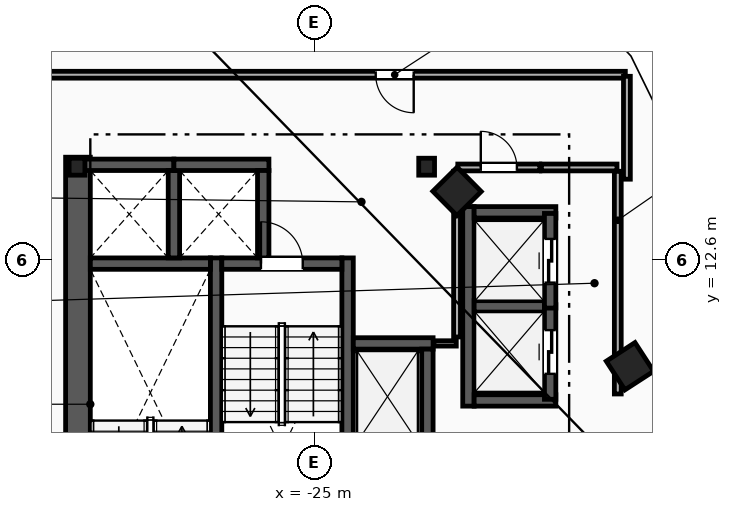
"""IFC4 building model, lengths in metres.
Left out: names, types, materials, properties, quantities, classifications, styles, units other than length and angle.
Written with IfcOpenShell. Run it as: python <this file> out.ifc"""

import sys

from ifc_helpers import new_model, si_unit, direction, frame, frame_2d, origin, origin_2d, place, context, subcontext, project, spatial, rectangle, i_section, extrude, element, fill, save


model = new_model("IFC4")
c1 = context("Model", 3, precision=1e-05, world=origin(), true_north=direction((0.0, 1.0)))
c2 = subcontext(c1, "Body", "Model", "MODEL_VIEW")
j1 = project(units=[si_unit("LENGTHUNIT", "METRE"), si_unit("PLANEANGLEUNIT", "RADIAN")], contexts=[c1])
p1 = place(None, origin())
s1 = spatial("IfcSite", under=j1, at=p1, CompositionType="ELEMENT")
p2 = place(p1, origin())
s2 = spatial("IfcBuilding", under=s1, at=p2, CompositionType="ELEMENT")
p3 = place(p2, frame((0.0, 0.0, 213.4)))
s3 = spatial("IfcBuildingStorey", under=s2, at=p3, CompositionType="ELEMENT", Elevation=213.4)
for number, where, z_axis, x_axis in (
    (1, (-22.05, 15.05, 0.0), (0.0, 0.0, 1.0), (1.0, 0.0, 0.0)),
    (2, (-31.25, 15.05, 0.0), (0.0, 0.0, 1.0), (1.0, 0.0, 0.0)),
):
    element("IfcColumn", number, at=place(p3, frame(where, z_axis=z_axis, x_axis=x_axis)), inside=s3, PredefinedType="COLUMN", context=c2, shape_type="SweptSolid", body=[
        extrude(i_section(OverallWidth=0.416, OverallDepth=0.446, WebThickness=0.039, FlangeThickness=0.063, FilletRadius=0.018, at=origin_2d()), origin(), (0.0, 0.0, 1.0), 3.6),
    ])
for number, where, z_axis, x_axis in (
    (3, (-16.7, 9.8, 0.0), (0.0, 0.0, 1.0), (-0.544, 0.839, 0.0)),
    (4, (-21.25, 14.4, 0.0), (0.0, 0.0, 1.0), (-0.703, 0.711, 0.0)),
):
    element("IfcColumn", number, at=place(p3, frame(where, z_axis=z_axis, x_axis=x_axis)), inside=s3, PredefinedType="COLUMN", context=c2, shape_type="SweptSolid", body=[
        extrude(rectangle(XDim=0.9, YDim=0.9, at=origin_2d()), origin(), (0.0, 0.0, 1.0), 3.6),
    ])
p4 = place(p3, frame((-31.225, 1.97, 0.0), z_axis=(0.0, 0.0, 1.0), x_axis=(0.0, 1.0, 0.0)))
e5 = element("IfcWall", 5, at=p4, inside=s3, PredefinedType="SHEAR", context=c2, shape_type="SweptSolid", body=[
    extrude(rectangle(XDim=13.33, YDim=0.65, at=frame_2d((6.665, 0.0))), origin(), (0.0, 0.0, 1.0), 3.34),
])
for number, where, z_axis, x_axis in (
    (6, (-27.59, 1.97, 0.0), (0.0, 0.0, 1.0), (0.0, 1.0, 0.0)),
    (7, (-24.13, 1.97, 0.0), (0.0, 0.0, 1.0), (0.0, 1.0, 0.0)),
):
    element("IfcWall", number, at=place(p3, frame(where, z_axis=z_axis, x_axis=x_axis)), inside=s3, PredefinedType="SHEAR", context=c2, shape_type="SweptSolid", body=[
        extrude(rectangle(XDim=10.68, YDim=0.3, at=frame_2d((5.34, 0.0))), origin(), (0.0, 0.0, 1.0), 3.34),
    ])
p5 = place(p3, frame((-30.9, 12.5, 0.0), z_axis=(0.0, 0.0, 1.0), x_axis=(1.0, 0.0, 0.0)))
e8 = element("IfcWall", 8, at=p5, inside=s3, PredefinedType="SHEAR", context=c2, shape_type="SweptSolid", body=[
    extrude(rectangle(XDim=3.16, YDim=0.3, at=frame_2d((1.58, 0.0))), origin(), (0.0, 0.0, 1.0), 3.34),
])
p6 = place(p3, frame((-27.44, 12.5, 0.0), z_axis=(0.0, 0.0, 1.0), x_axis=(1.0, 0.0, 0.0)))
e9 = element("IfcWall", 9, at=p6, inside=s3, PredefinedType="SHEAR", context=c2, shape_type="SweptSolid", body=[
    extrude(rectangle(XDim=3.16, YDim=0.3, at=frame_2d((1.58, 0.0))), origin(), (0.0, 0.0, 1.0), 3.34),
])
p7 = place(p6, frame((1.03, 0.0, 0.0)))
e10 = element("IfcOpeningElement", 10, at=p7, cuts=e9, PredefinedType="OPENING", context=c2, shape_type="SweptSolid", body=[
    extrude(rectangle(XDim=1.1, YDim=2.15, at=frame_2d((0.55, 1.075))), frame((0.0, 0.16, 0.0), z_axis=(0.0, -1.0, 0.0), x_axis=(1.0, 0.0, 0.0)), (0.0, 0.0, 1.0), 0.32),
])
p8 = place(p3, frame((-23.98, 10.4, 0.0), z_axis=(0.0, 0.0, 1.0), x_axis=(1.0, 0.0, 0.0)))
e11 = element("IfcWall", 11, at=p8, inside=s3, PredefinedType="SHEAR", context=c2, shape_type="SweptSolid", body=[
    extrude(rectangle(XDim=2.1, YDim=0.3, at=frame_2d((1.05, 0.0))), origin(), (0.0, 0.0, 1.0), 3.34),
])
for number, where, z_axis, x_axis in (
    (12, (-22.03, 7.75, 0.0), (0.0, 0.0, 1.0), (0.0, 1.0, 0.0)),
    (13, (-31.2, 15.1, 0.0), (0.0, 0.0, 1.0), (1.0, 0.0, 0.0)),
):
    element("IfcWall", number, at=place(p3, frame(where, z_axis=z_axis, x_axis=x_axis)), inside=s3, PredefinedType="SHEAR", context=c2, shape_type="SweptSolid", body=[
        extrude(rectangle(XDim=2.5, YDim=0.3, at=frame_2d((1.25, 0.0))), origin(), (0.0, 0.0, 1.0), 3.34),
    ])
p9 = place(p3, frame((-28.7, 12.65, 0.0), z_axis=(0.0, 0.0, 1.0), x_axis=(0.0, 1.0, 0.0)))
e14 = element("IfcWall", 14, at=p9, inside=s3, PredefinedType="SHEAR", context=c2, shape_type="SweptSolid", body=[
    extrude(rectangle(XDim=2.3, YDim=0.3, at=frame_2d((1.15, 0.0))), origin(), (0.0, 0.0, 1.0), 3.34),
])
p10 = place(p3, frame((-28.7, 15.1, 0.0), z_axis=(0.0, 0.0, 1.0), x_axis=(1.0, 0.0, 0.0)))
e15 = element("IfcWall", 15, at=p10, inside=s3, PredefinedType="SHEAR", context=c2, shape_type="SweptSolid", body=[
    extrude(rectangle(XDim=2.5, YDim=0.3, at=frame_2d((1.25, 0.0))), origin(), (0.0, 0.0, 1.0), 3.34),
])
p11 = place(p3, frame((-26.35, 12.65, 0.0), z_axis=(0.0, 0.0, 1.0), x_axis=(0.0, 1.0, 0.0)))
e16 = element("IfcWall", 16, at=p11, inside=s3, PredefinedType="SHEAR", context=c2, shape_type="SweptSolid", body=[
    extrude(rectangle(XDim=2.3, YDim=0.3, at=frame_2d((1.15, 0.0))), origin(), (0.0, 0.0, 1.0), 3.34),
])
p12 = place(p3, frame((-20.95, 8.75, 0.0), z_axis=(0.0, 0.0, 1.0), x_axis=(0.0, 1.0, 0.0)))
e17 = element("IfcWall", 17, at=p12, inside=s3, PredefinedType="SHEAR", context=c2, shape_type="SweptSolid", body=[
    extrude(rectangle(XDim=5.25, YDim=0.3, at=frame_2d((2.625, 0.0))), origin(), (0.0, 0.0, 1.0), 3.34),
])
for number, where, z_axis, x_axis in (
    (18, (-20.8, 8.9, 0.0), (0.0, 0.0, 1.0), (1.0, 0.0, 0.0)),
    (19, (-20.8, 13.85, 0.0), (0.0, 0.0, 1.0), (1.0, 0.0, 0.0)),
):
    element("IfcWall", number, at=place(p3, frame(where, z_axis=z_axis, x_axis=x_axis)), inside=s3, PredefinedType="SHEAR", context=c2, shape_type="SweptSolid", body=[
        extrude(rectangle(XDim=2.15, YDim=0.3, at=frame_2d((1.075, 0.0))), origin(), (0.0, 0.0, 1.0), 3.34),
    ])
p13 = place(p3, frame((-20.8, 11.375, 0.0), z_axis=(0.0, 0.0, 1.0), x_axis=(1.0, 0.0, 0.0)))
e20 = element("IfcWall", 20, at=p13, inside=s3, PredefinedType="SHEAR", context=c2, shape_type="SweptSolid", body=[
    extrude(rectangle(XDim=1.85, YDim=0.3, at=frame_2d((0.925, 0.0))), origin(), (0.0, 0.0, 1.0), 3.34),
])
p14 = place(p3, frame((-18.8, 8.93, 0.0), z_axis=(0.0, 0.0, 1.0), x_axis=(0.0, 1.0, 0.0)))
e21 = element("IfcWall", 21, at=p14, inside=s3, PredefinedType="SHEAR", context=c2, shape_type="SweptSolid", body=[
    extrude(rectangle(XDim=2.49, YDim=0.3, at=frame_2d((1.245, 0.0))), origin(), (0.0, 0.0, 1.0), 3.34),
])
p15 = place(p14, frame((0.67, 0.0, 0.0)))
e22 = element("IfcOpeningElement", 22, at=p15, cuts=e21, PredefinedType="OPENING", context=c2, shape_type="SweptSolid", body=[
    extrude(rectangle(XDim=1.15, YDim=2.2, at=frame_2d((0.575, 1.1))), frame((0.0, 0.16, 0.0), z_axis=(0.0, -1.0, 0.0), x_axis=(1.0, 0.0, 0.0)), (0.0, 0.0, 1.0), 0.32),
])
p16 = place(p3, frame((-18.8, 11.33, 0.0), z_axis=(0.0, 0.0, 1.0), x_axis=(0.0, 1.0, 0.0)))
e23 = element("IfcWall", 23, at=p16, inside=s3, PredefinedType="SHEAR", context=c2, shape_type="SweptSolid", body=[
    extrude(rectangle(XDim=2.49, YDim=0.3, at=frame_2d((1.245, 0.0))), origin(), (0.0, 0.0, 1.0), 3.34),
])
p17 = place(p16, frame((0.67, 0.0, 0.0)))
e24 = element("IfcOpeningElement", 24, at=p17, cuts=e23, PredefinedType="OPENING", context=c2, shape_type="SweptSolid", body=[
    extrude(rectangle(XDim=1.15, YDim=2.2, at=frame_2d((0.575, 1.1))), frame((0.0, 0.16, 0.0), z_axis=(0.0, -1.0, 0.0), x_axis=(1.0, 0.0, 0.0)), (0.0, 0.0, 1.0), 0.32),
])
p18 = place(p3, frame((-17.02, 9.07, 0.0), z_axis=(0.0, 0.0, 1.0), x_axis=(0.0, 1.0, 0.0)))
e25 = element("IfcWall", 25, at=p18, inside=s3, PredefinedType="PARTITIONING", context=c2, shape_type="SweptSolid", body=[
    extrude(rectangle(XDim=5.86, YDim=0.18, at=frame_2d((2.93, 0.0))), origin(), (0.0, 0.0, 1.0), 3.34),
])
p19 = place(p3, frame((-21.23, 15.03, 0.0), z_axis=(0.0, 0.0, 1.0), x_axis=(1.0, 0.0, 0.0)))
e26 = element("IfcWall", 26, at=p19, inside=s3, PredefinedType="PARTITIONING", context=c2, shape_type="SweptSolid", body=[
    extrude(rectangle(XDim=2.16, YDim=0.18, at=frame_2d((1.08, 0.0))), origin(), (0.0, 0.0, 1.0), 3.34),
])
p20 = place(p19, frame((0.605, 0.0, 0.0)))
e27 = element("IfcOpeningElement", 27, at=p20, cuts=e26, PredefinedType="OPENING", context=c2, shape_type="SweptSolid", body=[
    extrude(rectangle(XDim=0.95, YDim=2.1, at=frame_2d((0.475, 1.05))), frame((0.0, 0.1, 0.0), z_axis=(0.0, -1.0, 0.0), x_axis=(1.0, 0.0, 0.0)), (0.0, 0.0, 1.0), 0.2),
])
p21 = place(p3, frame((-19.03, 15.03, 0.0), z_axis=(0.0, 0.0, 1.0), x_axis=(1.0, 0.0, 0.0)))
e28 = element("IfcWall", 28, at=p21, inside=s3, PredefinedType="PARTITIONING", context=c2, shape_type="SweptSolid", body=[
    extrude(rectangle(XDim=1.99, YDim=0.18, at=frame_2d((0.995, 0.0))), origin(), (0.0, 0.0, 1.0), 3.34),
])
p22 = place(p3, frame((-21.86, 10.4, 0.0), z_axis=(0.0, 0.0, 1.0), x_axis=(1.0, 0.0, 0.0)))
e29 = element("IfcWall", 29, at=p22, inside=s3, PredefinedType="PARTITIONING", context=c2, shape_type="SweptSolid", body=[
    extrude(rectangle(XDim=0.59, YDim=0.14, at=frame_2d((0.295, 0.0))), origin(), (0.0, 0.0, 1.0), 3.34),
])
p23 = place(p3, frame((-21.25, 10.57, 0.0), z_axis=(0.0, 0.0, 1.0), x_axis=(0.0, 1.0, 0.0)))
e30 = element("IfcWall", 30, at=p23, inside=s3, PredefinedType="PARTITIONING", context=c2, shape_type="SweptSolid", body=[
    extrude(rectangle(XDim=4.36, YDim=0.18, at=frame_2d((2.18, 0.0))), origin(), (0.0, 0.0, 1.0), 3.34),
])
p24 = place(p3, frame((-16.822, 17.47, 0.0), z_axis=(0.0, 0.0, 1.0), x_axis=(-1.0, 0.0, 0.0)))
e31 = element("IfcWall", 31, at=p24, inside=s3, PredefinedType="PARTITIONING", context=c2, shape_type="SweptSolid", body=[
    extrude(rectangle(XDim=16.807, YDim=0.18, at=frame_2d((8.403, 0.0))), origin(), (0.0, 0.0, 1.0), 3.34),
])
p25 = place(p24, frame((5.569, 0.0, 0.0)))
e32 = element("IfcOpeningElement", 32, at=p25, cuts=e31, PredefinedType="OPENING", context=c2, shape_type="SweptSolid", body=[
    extrude(rectangle(XDim=1.0, YDim=2.15, at=frame_2d((0.5, 1.075))), frame((0.0, 0.1, 0.0), z_axis=(0.0, -1.0, 0.0), x_axis=(1.0, 0.0, 0.0)), (0.0, 0.0, 1.0), 0.2),
])
p26 = place(p3, frame((-16.78, 14.721, 0.0), z_axis=(0.0, 0.0, 1.0), x_axis=(0.0, 1.0, 0.0)))
e33 = element("IfcWall", 33, at=p26, inside=s3, PredefinedType="PARTITIONING", context=c2, shape_type="SweptSolid", body=[
    extrude(rectangle(XDim=2.707, YDim=0.18, at=frame_2d((1.354, 0.0))), origin(), (0.0, 0.0, 1.0), 3.34),
])
p27 = place(p7, origin())
e34 = element("IfcDoor", 34, at=p27, inside=s3, OperationType="SINGLE_SWING_LEFT", PredefinedType="DOOR", context=c2, shape_type="SweptSolid", body=[
    extrude(rectangle(XDim=1.1, YDim=2.15, at=frame_2d((0.55, 1.075))), frame((0.0, 0.025, 0.0), z_axis=(0.0, -1.0, 0.0), x_axis=(1.0, 0.0, 0.0)), (0.0, 0.0, 1.0), 0.05),
])
fill(e10, e34)
p28 = place(p15, origin())
e35 = element("IfcDoor", 35, at=p28, inside=s3, OperationType="SLIDING_TO_LEFT", PredefinedType="TRAPDOOR", context=c2, shape_type="SweptSolid", body=[
    extrude(rectangle(XDim=1.15, YDim=2.2, at=frame_2d((0.575, 1.1))), frame((0.0, 0.025, 0.0), z_axis=(0.0, -1.0, 0.0), x_axis=(1.0, 0.0, 0.0)), (0.0, 0.0, 1.0), 0.05),
])
fill(e22, e35)
p29 = place(p17, origin())
e36 = element("IfcDoor", 36, at=p29, inside=s3, OperationType="SLIDING_TO_LEFT", PredefinedType="TRAPDOOR", context=c2, shape_type="SweptSolid", body=[
    extrude(rectangle(XDim=1.15, YDim=2.2, at=frame_2d((0.575, 1.1))), frame((0.0, 0.025, 0.0), z_axis=(0.0, -1.0, 0.0), x_axis=(1.0, 0.0, 0.0)), (0.0, 0.0, 1.0), 0.05),
])
fill(e24, e36)
p30 = place(p25, origin())
e37 = element("IfcDoor", 37, at=p30, inside=s3, OperationType="SINGLE_SWING_LEFT", PredefinedType="DOOR", context=c2, shape_type="SweptSolid", body=[
    extrude(rectangle(XDim=1.0, YDim=2.15, at=frame_2d((0.5, 1.075))), frame((0.0, 0.025, 0.0), z_axis=(0.0, -1.0, 0.0), x_axis=(1.0, 0.0, 0.0)), (0.0, 0.0, 1.0), 0.05),
])
fill(e32, e37)
p31 = place(p20, origin())
e38 = element("IfcDoor", 38, at=p31, inside=s3, OperationType="SINGLE_SWING_LEFT", PredefinedType="DOOR", context=c2, shape_type="SweptSolid", body=[
    extrude(rectangle(XDim=0.95, YDim=2.1, at=frame_2d((0.475, 1.05))), frame((0.0, 0.025, 0.0), z_axis=(0.0, -1.0, 0.0), x_axis=(1.0, 0.0, 0.0)), (0.0, 0.0, 1.0), 0.05),
])
fill(e27, e38)
save(model, sys.argv[1])
